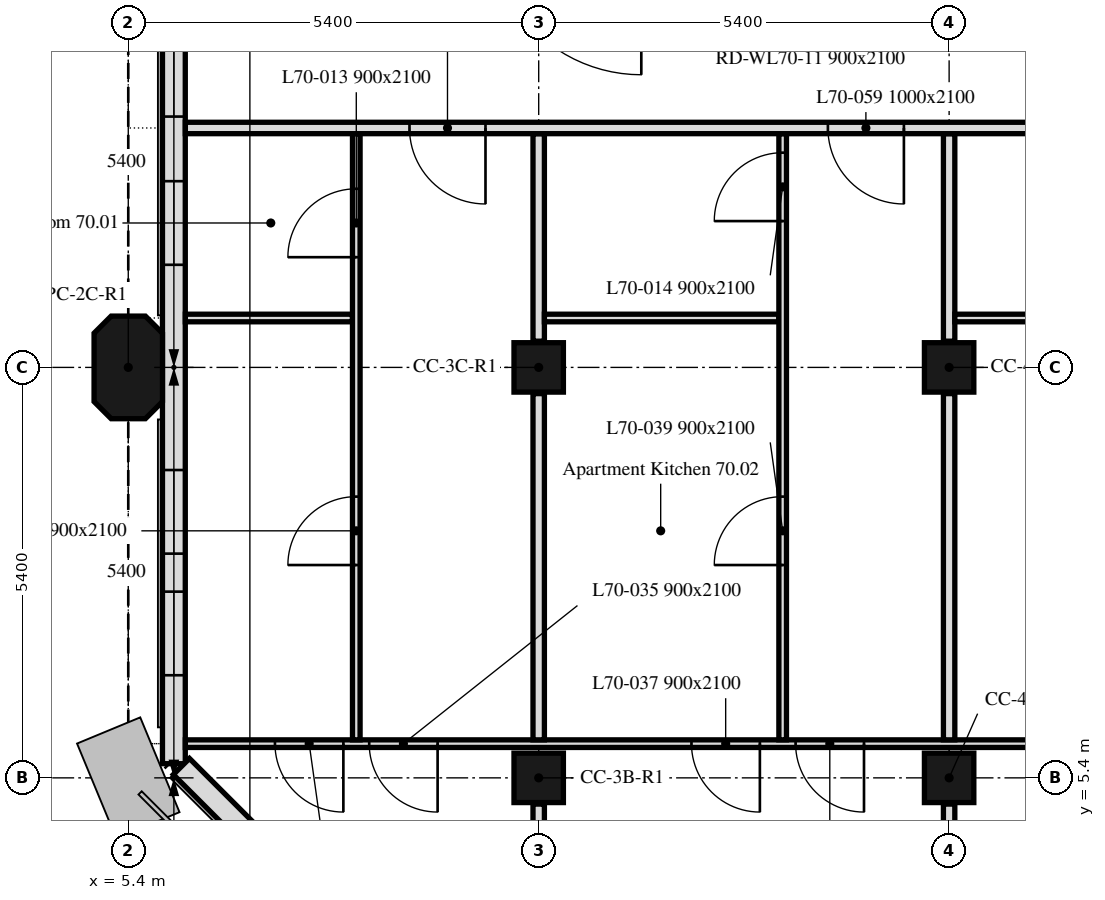
"""IFC4 building model, lengths in metres.
Left out: names, types, materials, properties, quantities, classifications, styles, units other than length and angle.
Written with IfcOpenShell. Run it as: python <this file> out.ifc"""

import sys

from ifc_helpers import new_model, si_unit, direction, frame, frame_2d, origin, origin_2d, place, context, subcontext, project, spatial, polyline, rectangle, outline, extrude, element, fill, save


model = new_model("IFC4")
c1 = context("Model", 3, precision=1e-05, world=origin(), true_north=direction((0.0, 1.0)))
c2 = subcontext(c1, "Body", "Model", "MODEL_VIEW")
j1 = project(units=[si_unit("LENGTHUNIT", "METRE"), si_unit("PLANEANGLEUNIT", "RADIAN")], contexts=[c1])
p1 = place(None, origin())
s1 = spatial("IfcSite", under=j1, at=p1, CompositionType="ELEMENT")
p2 = place(p1, origin())
s2 = spatial("IfcBuilding", under=s1, at=p2, CompositionType="ELEMENT")
p3 = place(p2, frame((0.0, 0.0, 285.1)))
s3 = spatial("IfcBuildingStorey", under=s2, at=p3, CompositionType="ELEMENT", Elevation=285.1)
for number, where, z_axis, x_axis in (
    (1, (10.8, 5.4, 0.0), (0.0, 0.0, 1.0), (1.0, 0.0, 0.0)),
    (2, (16.2, 5.4, 0.0), (0.0, 0.0, 1.0), (1.0, 0.0, 0.0)),
):
    element("IfcColumn", number, at=place(p3, frame(where, z_axis=z_axis, x_axis=x_axis)), inside=s3, PredefinedType="COLUMN", context=c2, shape_type="SweptSolid", body=[
        extrude(rectangle(XDim=0.65, YDim=0.65, at=origin_2d()), origin(), (0.0, 0.0, 1.0), 3.0),
    ])
p4 = place(p3, frame((5.4, 10.8, 0.0), z_axis=(0.0, 0.0, 1.0), x_axis=(0.0, 1.0, 0.0)))
e3 = element("IfcColumn", 3, at=p4, inside=s3, PredefinedType="COLUMN", context=c2, shape_type="SweptSolid", body=[
    extrude(outline(polyline([(-0.45, -0.45), (0.45, -0.45), (0.675, -0.225), (0.675, 0.225), (0.45, 0.45), (-0.45, 0.45), (-0.675, 0.225), (-0.675, -0.225), (-0.45, -0.45)])), origin(), (0.0, 0.0, 1.0), 3.0),
])
for number, where, z_axis, x_axis in (
    (4, (10.8, 10.8, 0.0), (0.0, 0.0, 1.0), (1.0, 0.0, 0.0)),
    (5, (16.2, 10.8, 0.0), (0.0, 0.0, 1.0), (1.0, 0.0, 0.0)),
):
    element("IfcColumn", number, at=place(p3, frame(where, z_axis=z_axis, x_axis=x_axis)), inside=s3, PredefinedType="COLUMN", context=c2, shape_type="SweptSolid", body=[
        extrude(rectangle(XDim=0.65, YDim=0.65, at=origin_2d()), origin(), (0.0, 0.0, 1.0), 3.0),
    ])
p5 = place(p3, frame((6.0, 16.2, 0.0), z_axis=(0.0, 0.0, 1.0), x_axis=(0.0, -1.0, 0.0)))
e6 = element("IfcWall", 6, at=p5, inside=s3, PredefinedType="SOLIDWALL", context=c2, shape_type="SweptSolid", body=[
    extrude(rectangle(XDim=10.614, YDim=0.3, at=frame_2d((5.307, 0.0))), origin(), (0.0, 0.0, 1.0), 3.0),
])
p6 = place(p5, frame((1.0, 0.0, 0.9)))
e7 = element("IfcOpeningElement", 7, at=p6, cuts=e6, PredefinedType="OPENING", context=c2, shape_type="SweptSolid", body=[
    extrude(rectangle(XDim=1.1, YDim=1.7, at=frame_2d((0.55, 0.85))), frame((0.0, 0.16, 0.0), z_axis=(0.0, -1.0, 0.0), x_axis=(1.0, 0.0, 0.0)), (0.0, 0.0, 1.0), 0.32),
])
p7 = place(p5, frame((2.95, 0.0, 0.9)))
e8 = element("IfcOpeningElement", 8, at=p7, cuts=e6, PredefinedType="OPENING", context=c2, shape_type="SweptSolid", body=[
    extrude(rectangle(XDim=1.1, YDim=1.7, at=frame_2d((0.55, 0.85))), frame((0.0, 0.16, 0.0), z_axis=(0.0, -1.0, 0.0), x_axis=(1.0, 0.0, 0.0)), (0.0, 0.0, 1.0), 0.32),
])
p8 = place(p5, frame((6.75, 0.0, 0.9)))
e9 = element("IfcOpeningElement", 9, at=p8, cuts=e6, PredefinedType="OPENING", context=c2, shape_type="SweptSolid", body=[
    extrude(rectangle(XDim=1.1, YDim=1.7, at=frame_2d((0.55, 0.85))), frame((0.0, 0.16, 0.0), z_axis=(0.0, -1.0, 0.0), x_axis=(1.0, 0.0, 0.0)), (0.0, 0.0, 1.0), 0.32),
])
p9 = place(p5, frame((8.35, 0.0, 0.9)))
e10 = element("IfcOpeningElement", 10, at=p9, cuts=e6, PredefinedType="OPENING", context=c2, shape_type="SweptSolid", body=[
    extrude(rectangle(XDim=1.1, YDim=1.7, at=frame_2d((0.55, 0.85))), frame((0.0, 0.16, 0.0), z_axis=(0.0, -1.0, 0.0), x_axis=(1.0, 0.0, 0.0)), (0.0, 0.0, 1.0), 0.32),
])
p10 = place(p3, frame((6.099, 5.55, 0.0), z_axis=(0.0, 0.0, 1.0), x_axis=(0.707106781187, -0.707106781187, 0.0)))
e11 = element("IfcWall", 11, at=p10, inside=s3, PredefinedType="SOLIDWALL", context=c2, shape_type="SweptSolid", body=[
    extrude(rectangle(XDim=6.86, YDim=0.3, at=frame_2d((3.43, 0.0))), origin(), (0.0, 0.0, 1.0), 3.0),
])
p11 = place(p10, frame((1.73, 0.0, 0.9)))
e12 = element("IfcOpeningElement", 12, at=p11, cuts=e11, PredefinedType="OPENING", context=c2, shape_type="SweptSolid", body=[
    extrude(rectangle(XDim=3.4, YDim=1.7, at=frame_2d((1.7, 0.85))), frame((0.0, 0.16, 0.0), z_axis=(0.0, -1.0, 0.0), x_axis=(1.0, 0.0, 0.0)), (0.0, 0.0, 1.0), 0.32),
])
p12 = place(p3, frame((10.8, 1.137, 0.0), z_axis=(0.0, 0.0, 1.0), x_axis=(0.0, 1.0, 0.0)))
e13 = element("IfcWall", 13, at=p12, inside=s3, PredefinedType="PARTITIONING", context=c2, shape_type="SweptSolid", body=[
    extrude(rectangle(XDim=3.918, YDim=0.15, at=frame_2d((1.959, 0.0))), origin(), (0.0, 0.0, 1.0), 3.0),
])
p13 = place(p3, frame((37.652, 5.85, 0.0), z_axis=(0.0, 0.0, 1.0), x_axis=(-1.0, 0.0, 0.0)))
e14 = element("IfcWall", 14, at=p13, inside=s3, PredefinedType="PARTITIONING", context=c2, shape_type="SweptSolid", body=[
    extrude(rectangle(XDim=31.501, YDim=0.1, at=frame_2d((15.75, 0.0))), origin(), (0.0, 0.0, 1.0), 2.4),
])
p14 = place(p13, frame((12.923, 0.0, 0.0)))
e15 = element("IfcOpeningElement", 15, at=p14, cuts=e14, PredefinedType="OPENING", context=c2, shape_type="SweptSolid", body=[
    extrude(rectangle(XDim=0.9, YDim=2.1, at=frame_2d((0.45, 1.05))), frame((0.0, 0.05, 0.0), z_axis=(0.0, -1.0, 0.0), x_axis=(1.0, 0.0, 0.0)), (0.0, 0.0, 1.0), 0.1),
])
p15 = place(p13, frame((29.422, 0.0, 0.0)))
e16 = element("IfcOpeningElement", 16, at=p15, cuts=e14, PredefinedType="OPENING", context=c2, shape_type="SweptSolid", body=[
    extrude(rectangle(XDim=0.9, YDim=2.1, at=frame_2d((0.45, 1.05))), frame((0.0, 0.05, 0.0), z_axis=(0.0, -1.0, 0.0), x_axis=(1.0, 0.0, 0.0)), (0.0, 0.0, 1.0), 0.1),
])
p16 = place(p13, frame((28.182, 0.0, 0.0)))
e17 = element("IfcOpeningElement", 17, at=p16, cuts=e14, PredefinedType="OPENING", context=c2, shape_type="SweptSolid", body=[
    extrude(rectangle(XDim=0.9, YDim=2.1, at=frame_2d((0.45, 1.05))), frame((0.0, 0.05, 0.0), z_axis=(0.0, -1.0, 0.0), x_axis=(1.0, 0.0, 0.0)), (0.0, 0.0, 1.0), 0.1),
])
p17 = place(p13, frame((23.942, 0.0, 0.0)))
e18 = element("IfcOpeningElement", 18, at=p17, cuts=e14, PredefinedType="OPENING", context=c2, shape_type="SweptSolid", body=[
    extrude(rectangle(XDim=0.9, YDim=2.1, at=frame_2d((0.45, 1.05))), frame((0.0, 0.05, 0.0), z_axis=(0.0, -1.0, 0.0), x_axis=(1.0, 0.0, 0.0)), (0.0, 0.0, 1.0), 0.1),
])
p18 = place(p13, frame((22.572, 0.0, 0.0)))
e19 = element("IfcOpeningElement", 19, at=p18, cuts=e14, PredefinedType="OPENING", context=c2, shape_type="SweptSolid", body=[
    extrude(rectangle(XDim=0.9, YDim=2.1, at=frame_2d((0.45, 1.05))), frame((0.0, 0.05, 0.0), z_axis=(0.0, -1.0, 0.0), x_axis=(1.0, 0.0, 0.0)), (0.0, 0.0, 1.0), 0.1),
])
p19 = place(p13, frame((19.466, 0.0, 0.0)))
e20 = element("IfcOpeningElement", 20, at=p19, cuts=e14, PredefinedType="OPENING", context=c2, shape_type="SweptSolid", body=[
    extrude(rectangle(XDim=0.9, YDim=2.1, at=frame_2d((0.45, 1.05))), frame((0.0, 0.05, 0.0), z_axis=(0.0, -1.0, 0.0), x_axis=(1.0, 0.0, 0.0)), (0.0, 0.0, 1.0), 0.1),
])
p20 = place(p13, frame((9.19, 0.0, 0.0)))
e21 = element("IfcOpeningElement", 21, at=p20, cuts=e14, PredefinedType="OPENING", context=c2, shape_type="SweptSolid", body=[
    extrude(rectangle(XDim=0.9, YDim=2.1, at=frame_2d((0.45, 1.05))), frame((0.0, 0.05, 0.0), z_axis=(0.0, -1.0, 0.0), x_axis=(1.0, 0.0, 0.0)), (0.0, 0.0, 1.0), 0.1),
])
p21 = place(p13, frame((7.512, 0.0, 0.0)))
e22 = element("IfcOpeningElement", 22, at=p21, cuts=e14, PredefinedType="OPENING", context=c2, shape_type="SweptSolid", body=[
    extrude(rectangle(XDim=0.9, YDim=2.1, at=frame_2d((0.45, 1.05))), frame((0.0, 0.05, 0.0), z_axis=(0.0, -1.0, 0.0), x_axis=(1.0, 0.0, 0.0)), (0.0, 0.0, 1.0), 0.1),
])
p22 = place(p13, frame((2.952, 0.0, 0.0)))
e23 = element("IfcOpeningElement", 23, at=p22, cuts=e14, PredefinedType="OPENING", context=c2, shape_type="SweptSolid", body=[
    extrude(rectangle(XDim=0.9, YDim=2.1, at=frame_2d((0.45, 1.05))), frame((0.0, 0.05, 0.0), z_axis=(0.0, -1.0, 0.0), x_axis=(1.0, 0.0, 0.0)), (0.0, 0.0, 1.0), 0.1),
])
p23 = place(p13, frame((18.096, 0.0, 0.0)))
e24 = element("IfcOpeningElement", 24, at=p23, cuts=e14, PredefinedType="OPENING", context=c2, shape_type="SweptSolid", body=[
    extrude(rectangle(XDim=0.9, YDim=2.1, at=frame_2d((0.45, 1.05))), frame((0.0, 0.05, 0.0), z_axis=(0.0, -1.0, 0.0), x_axis=(1.0, 0.0, 0.0)), (0.0, 0.0, 1.0), 0.1),
])
p24 = place(p3, frame((8.35, 11.45, 0.0), z_axis=(0.0, 0.0, 1.0), x_axis=(-1.0, 0.0, 0.0)))
e25 = element("IfcWall", 25, at=p24, inside=s3, PredefinedType="PARTITIONING", context=c2, shape_type="SweptSolid", body=[
    extrude(rectangle(XDim=2.199, YDim=0.1, at=frame_2d((1.1, 0.0))), origin(), (0.0, 0.0, 1.0), 3.0),
])
p25 = place(p3, frame((8.4, 5.9, 0.0), z_axis=(0.0, 0.0, 1.0), x_axis=(0.0, 1.0, 0.0)))
e26 = element("IfcWall", 26, at=p25, inside=s3, PredefinedType="PARTITIONING", context=c2, shape_type="SweptSolid", body=[
    extrude(rectangle(XDim=7.975, YDim=0.1, at=frame_2d((3.988, 0.0))), origin(), (0.0, 0.0, 1.0), 3.0),
])
p26 = place(p25, frame((6.35, 0.0, 0.0)))
e27 = element("IfcOpeningElement", 27, at=p26, cuts=e26, PredefinedType="OPENING", context=c2, shape_type="SweptSolid", body=[
    extrude(rectangle(XDim=0.9, YDim=2.1, at=frame_2d((0.45, 1.05))), frame((0.0, 0.05, 0.0), z_axis=(0.0, -1.0, 0.0), x_axis=(1.0, 0.0, 0.0)), (0.0, 0.0, 1.0), 0.1),
])
p27 = place(p25, frame((2.3, 0.0, 0.0)))
e28 = element("IfcOpeningElement", 28, at=p27, cuts=e26, PredefinedType="OPENING", context=c2, shape_type="SweptSolid", body=[
    extrude(rectangle(XDim=0.9, YDim=2.1, at=frame_2d((0.45, 1.05))), frame((0.0, 0.05, 0.0), z_axis=(0.0, -1.0, 0.0), x_axis=(1.0, 0.0, 0.0)), (0.0, 0.0, 1.0), 0.1),
])
p28 = place(p3, frame((10.8, 5.9, 0.0), z_axis=(0.0, 0.0, 1.0), x_axis=(0.0, 1.0, 0.0)))
e29 = element("IfcWall", 29, at=p28, inside=s3, PredefinedType="PARTITIONING", context=c2, shape_type="SweptSolid", body=[
    extrude(rectangle(XDim=4.555, YDim=0.15, at=frame_2d((2.278, 0.0))), origin(), (0.0, 0.0, 1.0), 3.0),
])
p29 = place(p3, frame((10.8, 11.145, 0.0), z_axis=(0.0, 0.0, 1.0), x_axis=(0.0, 1.0, 0.0)))
e30 = element("IfcWall", 30, at=p29, inside=s3, PredefinedType="PARTITIONING", context=c2, shape_type="SweptSolid", body=[
    extrude(rectangle(XDim=2.73, YDim=0.15, at=frame_2d((1.365, 0.0))), origin(), (0.0, 0.0, 1.0), 3.0),
])
p30 = place(p3, frame((16.2, 0.751, 0.0), z_axis=(0.0, 0.0, 1.0), x_axis=(0.0, 1.0, 0.0)))
e31 = element("IfcWall", 31, at=p30, inside=s3, PredefinedType="PARTITIONING", context=c2, shape_type="SweptSolid", body=[
    extrude(rectangle(XDim=4.304, YDim=0.15, at=frame_2d((2.152, 0.0))), origin(), (0.0, 0.0, 1.0), 2.4),
])
p31 = place(p3, frame((13.96, 11.45, 0.0), z_axis=(0.0, 0.0, 1.0), x_axis=(-1.0, 0.0, 0.0)))
e32 = element("IfcWall", 32, at=p31, inside=s3, PredefinedType="PARTITIONING", context=c2, shape_type="SweptSolid", body=[
    extrude(rectangle(XDim=3.085, YDim=0.1, at=frame_2d((1.542, 0.0))), origin(), (0.0, 0.0, 1.0), 3.0),
])
p32 = place(p3, frame((14.01, 5.9, 0.0), z_axis=(0.0, 0.0, 1.0), x_axis=(0.0, 1.0, 0.0)))
e33 = element("IfcWall", 33, at=p32, inside=s3, PredefinedType="PARTITIONING", context=c2, shape_type="SweptSolid", body=[
    extrude(rectangle(XDim=7.975, YDim=0.1, at=frame_2d((3.988, 0.0))), origin(), (0.0, 0.0, 1.0), 3.0),
])
p33 = place(p32, frame((6.825, 0.0, 0.0)))
e34 = element("IfcOpeningElement", 34, at=p33, cuts=e33, PredefinedType="OPENING", context=c2, shape_type="SweptSolid", body=[
    extrude(rectangle(XDim=0.9, YDim=2.1, at=frame_2d((0.45, 1.05))), frame((0.0, 0.05, 0.0), z_axis=(0.0, -1.0, 0.0), x_axis=(1.0, 0.0, 0.0)), (0.0, 0.0, 1.0), 0.1),
])
p34 = place(p32, frame((2.3, 0.0, 0.0)))
e35 = element("IfcOpeningElement", 35, at=p34, cuts=e33, PredefinedType="OPENING", context=c2, shape_type="SweptSolid", body=[
    extrude(rectangle(XDim=0.9, YDim=2.1, at=frame_2d((0.45, 1.05))), frame((0.0, 0.05, 0.0), z_axis=(0.0, -1.0, 0.0), x_axis=(1.0, 0.0, 0.0)), (0.0, 0.0, 1.0), 0.1),
])
p35 = place(p3, frame((16.2, 5.9, 0.0), z_axis=(0.0, 0.0, 1.0), x_axis=(0.0, 1.0, 0.0)))
e36 = element("IfcWall", 36, at=p35, inside=s3, PredefinedType="PARTITIONING", context=c2, shape_type="SweptSolid", body=[
    extrude(rectangle(XDim=4.555, YDim=0.15, at=frame_2d((2.278, 0.0))), origin(), (0.0, 0.0, 1.0), 2.4),
])
p36 = place(p3, frame((16.2, 11.145, 0.0), z_axis=(0.0, 0.0, 1.0), x_axis=(0.0, 1.0, 0.0)))
e37 = element("IfcWall", 37, at=p36, inside=s3, PredefinedType="PARTITIONING", context=c2, shape_type="SweptSolid", body=[
    extrude(rectangle(XDim=2.73, YDim=0.15, at=frame_2d((1.365, 0.0))), origin(), (0.0, 0.0, 1.0), 2.4),
])
p37 = place(p3, frame((18.306, 11.45, 0.0), z_axis=(0.0, 0.0, 1.0), x_axis=(-1.0, 0.0, 0.0)))
e38 = element("IfcWall", 38, at=p37, inside=s3, PredefinedType="PARTITIONING", context=c2, shape_type="SweptSolid", body=[
    extrude(rectangle(XDim=2.031, YDim=0.1, at=frame_2d((1.016, 0.0))), origin(), (0.0, 0.0, 1.0), 3.0),
])
p38 = place(p3, frame((47.849, 13.95, 0.0), z_axis=(0.0, 0.0, 1.0), x_axis=(-1.0, 0.0, 0.0)))
e39 = element("IfcWall", 39, at=p38, inside=s3, PredefinedType="PARTITIONING", context=c2, shape_type="SweptSolid", body=[
    extrude(rectangle(XDim=41.698, YDim=0.15, at=frame_2d((20.849, 0.0))), origin(), (0.0, 0.0, 1.0), 2.4),
])
p39 = place(p38, frame((37.749, 0.0, 0.0)))
e40 = element("IfcOpeningElement", 40, at=p39, cuts=e39, PredefinedType="OPENING", context=c2, shape_type="SweptSolid", body=[
    extrude(rectangle(XDim=1.0, YDim=2.1, at=frame_2d((0.5, 1.05))), frame((0.0, 0.075, 0.0), z_axis=(0.0, -1.0, 0.0), x_axis=(1.0, 0.0, 0.0)), (0.0, 0.0, 1.0), 0.15),
])
p40 = place(p38, frame((32.244, 0.0, 0.0)))
e41 = element("IfcOpeningElement", 41, at=p40, cuts=e39, PredefinedType="OPENING", context=c2, shape_type="SweptSolid", body=[
    extrude(rectangle(XDim=1.0, YDim=2.1, at=frame_2d((0.5, 1.05))), frame((0.0, 0.075, 0.0), z_axis=(0.0, -1.0, 0.0), x_axis=(1.0, 0.0, 0.0)), (0.0, 0.0, 1.0), 0.15),
])
p41 = place(p38, frame((27.735, 0.0, 0.0)))
e42 = element("IfcOpeningElement", 42, at=p41, cuts=e39, PredefinedType="OPENING", context=c2, shape_type="SweptSolid", body=[
    extrude(rectangle(XDim=1.0, YDim=2.1, at=frame_2d((0.5, 1.05))), frame((0.0, 0.075, 0.0), z_axis=(0.0, -1.0, 0.0), x_axis=(1.0, 0.0, 0.0)), (0.0, 0.0, 1.0), 0.15),
])
p42 = place(p38, frame((8.347, 0.0, 0.0)))
e43 = element("IfcOpeningElement", 43, at=p42, cuts=e39, PredefinedType="OPENING", context=c2, shape_type="SweptSolid", body=[
    extrude(rectangle(XDim=1.0, YDim=2.1, at=frame_2d((0.5, 1.05))), frame((0.0, 0.075, 0.0), z_axis=(0.0, -1.0, 0.0), x_axis=(1.0, 0.0, 0.0)), (0.0, 0.0, 1.0), 0.15),
])
p43 = place(p6, origin())
e44 = element("IfcWindow", 44, at=p43, inside=s3, PartitioningType="SINGLE_PANEL", PredefinedType="WINDOW", context=c2, shape_type="SweptSolid", body=[
    extrude(rectangle(XDim=1.1, YDim=1.7, at=frame_2d((0.55, 0.85))), frame((0.0, 0.03, 0.0), z_axis=(0.0, -1.0, 0.0), x_axis=(1.0, 0.0, 0.0)), (0.0, 0.0, 1.0), 0.06),
])
fill(e7, e44)
p44 = place(p7, origin())
e45 = element("IfcWindow", 45, at=p44, inside=s3, PartitioningType="SINGLE_PANEL", PredefinedType="WINDOW", context=c2, shape_type="SweptSolid", body=[
    extrude(rectangle(XDim=1.1, YDim=1.7, at=frame_2d((0.55, 0.85))), frame((0.0, 0.03, 0.0), z_axis=(0.0, -1.0, 0.0), x_axis=(1.0, 0.0, 0.0)), (0.0, 0.0, 1.0), 0.06),
])
fill(e8, e45)
p45 = place(p8, origin())
e46 = element("IfcWindow", 46, at=p45, inside=s3, PartitioningType="SINGLE_PANEL", PredefinedType="WINDOW", context=c2, shape_type="SweptSolid", body=[
    extrude(rectangle(XDim=1.1, YDim=1.7, at=frame_2d((0.55, 0.85))), frame((0.0, 0.03, 0.0), z_axis=(0.0, -1.0, 0.0), x_axis=(1.0, 0.0, 0.0)), (0.0, 0.0, 1.0), 0.06),
])
fill(e9, e46)
p46 = place(p9, origin())
e47 = element("IfcWindow", 47, at=p46, inside=s3, PartitioningType="SINGLE_PANEL", PredefinedType="WINDOW", context=c2, shape_type="SweptSolid", body=[
    extrude(rectangle(XDim=1.1, YDim=1.7, at=frame_2d((0.55, 0.85))), frame((0.0, 0.03, 0.0), z_axis=(0.0, -1.0, 0.0), x_axis=(1.0, 0.0, 0.0)), (0.0, 0.0, 1.0), 0.06),
])
fill(e10, e47)
p47 = place(p26, origin())
e48 = element("IfcDoor", 48, at=p47, inside=s3, OperationType="SINGLE_SWING_LEFT", PredefinedType="DOOR", context=c2, shape_type="SweptSolid", body=[
    extrude(rectangle(XDim=0.9, YDim=2.1, at=frame_2d((0.45, 1.05))), frame((0.0, 0.025, 0.0), z_axis=(0.0, -1.0, 0.0), x_axis=(1.0, 0.0, 0.0)), (0.0, 0.0, 1.0), 0.05),
])
fill(e27, e48)
p48 = place(p33, origin())
e49 = element("IfcDoor", 49, at=p48, inside=s3, OperationType="SINGLE_SWING_RIGHT", PredefinedType="DOOR", context=c2, shape_type="SweptSolid", body=[
    extrude(rectangle(XDim=0.9, YDim=2.1, at=frame_2d((0.45, 1.05))), frame((0.0, 0.025, 0.0), z_axis=(0.0, -1.0, 0.0), x_axis=(1.0, 0.0, 0.0)), (0.0, 0.0, 1.0), 0.05),
])
fill(e34, e49)
p49 = place(p15, origin())
e50 = element("IfcDoor", 50, at=p49, inside=s3, OperationType="SINGLE_SWING_LEFT", PredefinedType="DOOR", context=c2, shape_type="SweptSolid", body=[
    extrude(rectangle(XDim=0.9, YDim=2.1, at=frame_2d((0.45, 1.05))), frame((0.0, 0.025, 0.0), z_axis=(0.0, -1.0, 0.0), x_axis=(1.0, 0.0, 0.0)), (0.0, 0.0, 1.0), 0.05),
])
fill(e16, e50)
p50 = place(p16, origin())
e51 = element("IfcDoor", 51, at=p50, inside=s3, OperationType="SINGLE_SWING_RIGHT", PredefinedType="DOOR", context=c2, shape_type="SweptSolid", body=[
    extrude(rectangle(XDim=0.9, YDim=2.1, at=frame_2d((0.45, 1.05))), frame((0.0, 0.025, 0.0), z_axis=(0.0, -1.0, 0.0), x_axis=(1.0, 0.0, 0.0)), (0.0, 0.0, 1.0), 0.05),
])
fill(e17, e51)
p51 = place(p27, origin())
e52 = element("IfcDoor", 52, at=p51, inside=s3, OperationType="SINGLE_SWING_RIGHT", PredefinedType="DOOR", context=c2, shape_type="SweptSolid", body=[
    extrude(rectangle(XDim=0.9, YDim=2.1, at=frame_2d((0.45, 1.05))), frame((0.0, 0.025, 0.0), z_axis=(0.0, -1.0, 0.0), x_axis=(1.0, 0.0, 0.0)), (0.0, 0.0, 1.0), 0.05),
])
fill(e28, e52)
p52 = place(p17, origin())
e53 = element("IfcDoor", 53, at=p52, inside=s3, OperationType="SINGLE_SWING_LEFT", PredefinedType="DOOR", context=c2, shape_type="SweptSolid", body=[
    extrude(rectangle(XDim=0.9, YDim=2.1, at=frame_2d((0.45, 1.05))), frame((0.0, 0.025, 0.0), z_axis=(0.0, -1.0, 0.0), x_axis=(1.0, 0.0, 0.0)), (0.0, 0.0, 1.0), 0.05),
])
fill(e18, e53)
p53 = place(p18, origin())
e54 = element("IfcDoor", 54, at=p53, inside=s3, OperationType="SINGLE_SWING_RIGHT", PredefinedType="DOOR", context=c2, shape_type="SweptSolid", body=[
    extrude(rectangle(XDim=0.9, YDim=2.1, at=frame_2d((0.45, 1.05))), frame((0.0, 0.025, 0.0), z_axis=(0.0, -1.0, 0.0), x_axis=(1.0, 0.0, 0.0)), (0.0, 0.0, 1.0), 0.05),
])
fill(e19, e54)
p54 = place(p34, origin())
e55 = element("IfcDoor", 55, at=p54, inside=s3, OperationType="SINGLE_SWING_LEFT", PredefinedType="DOOR", context=c2, shape_type="SweptSolid", body=[
    extrude(rectangle(XDim=0.9, YDim=2.1, at=frame_2d((0.45, 1.05))), frame((0.0, 0.025, 0.0), z_axis=(0.0, -1.0, 0.0), x_axis=(1.0, 0.0, 0.0)), (0.0, 0.0, 1.0), 0.05),
])
fill(e35, e55)
p55 = place(p39, origin())
e56 = element("IfcDoor", 56, at=p55, inside=s3, OperationType="SINGLE_SWING_LEFT", PredefinedType="DOOR", context=c2, shape_type="SweptSolid", body=[
    extrude(rectangle(XDim=1.0, YDim=2.1, at=frame_2d((0.5, 1.05))), frame((0.0, 0.025, 0.0), z_axis=(0.0, -1.0, 0.0), x_axis=(1.0, 0.0, 0.0)), (0.0, 0.0, 1.0), 0.05),
])
fill(e40, e56)
p56 = place(p40, origin())
e57 = element("IfcDoor", 57, at=p56, inside=s3, OperationType="SINGLE_SWING_LEFT", PredefinedType="DOOR", context=c2, shape_type="SweptSolid", body=[
    extrude(rectangle(XDim=1.0, YDim=2.1, at=frame_2d((0.5, 1.05))), frame((0.0, 0.025, 0.0), z_axis=(0.0, -1.0, 0.0), x_axis=(1.0, 0.0, 0.0)), (0.0, 0.0, 1.0), 0.05),
])
fill(e41, e57)
save(model, sys.argv[1])
